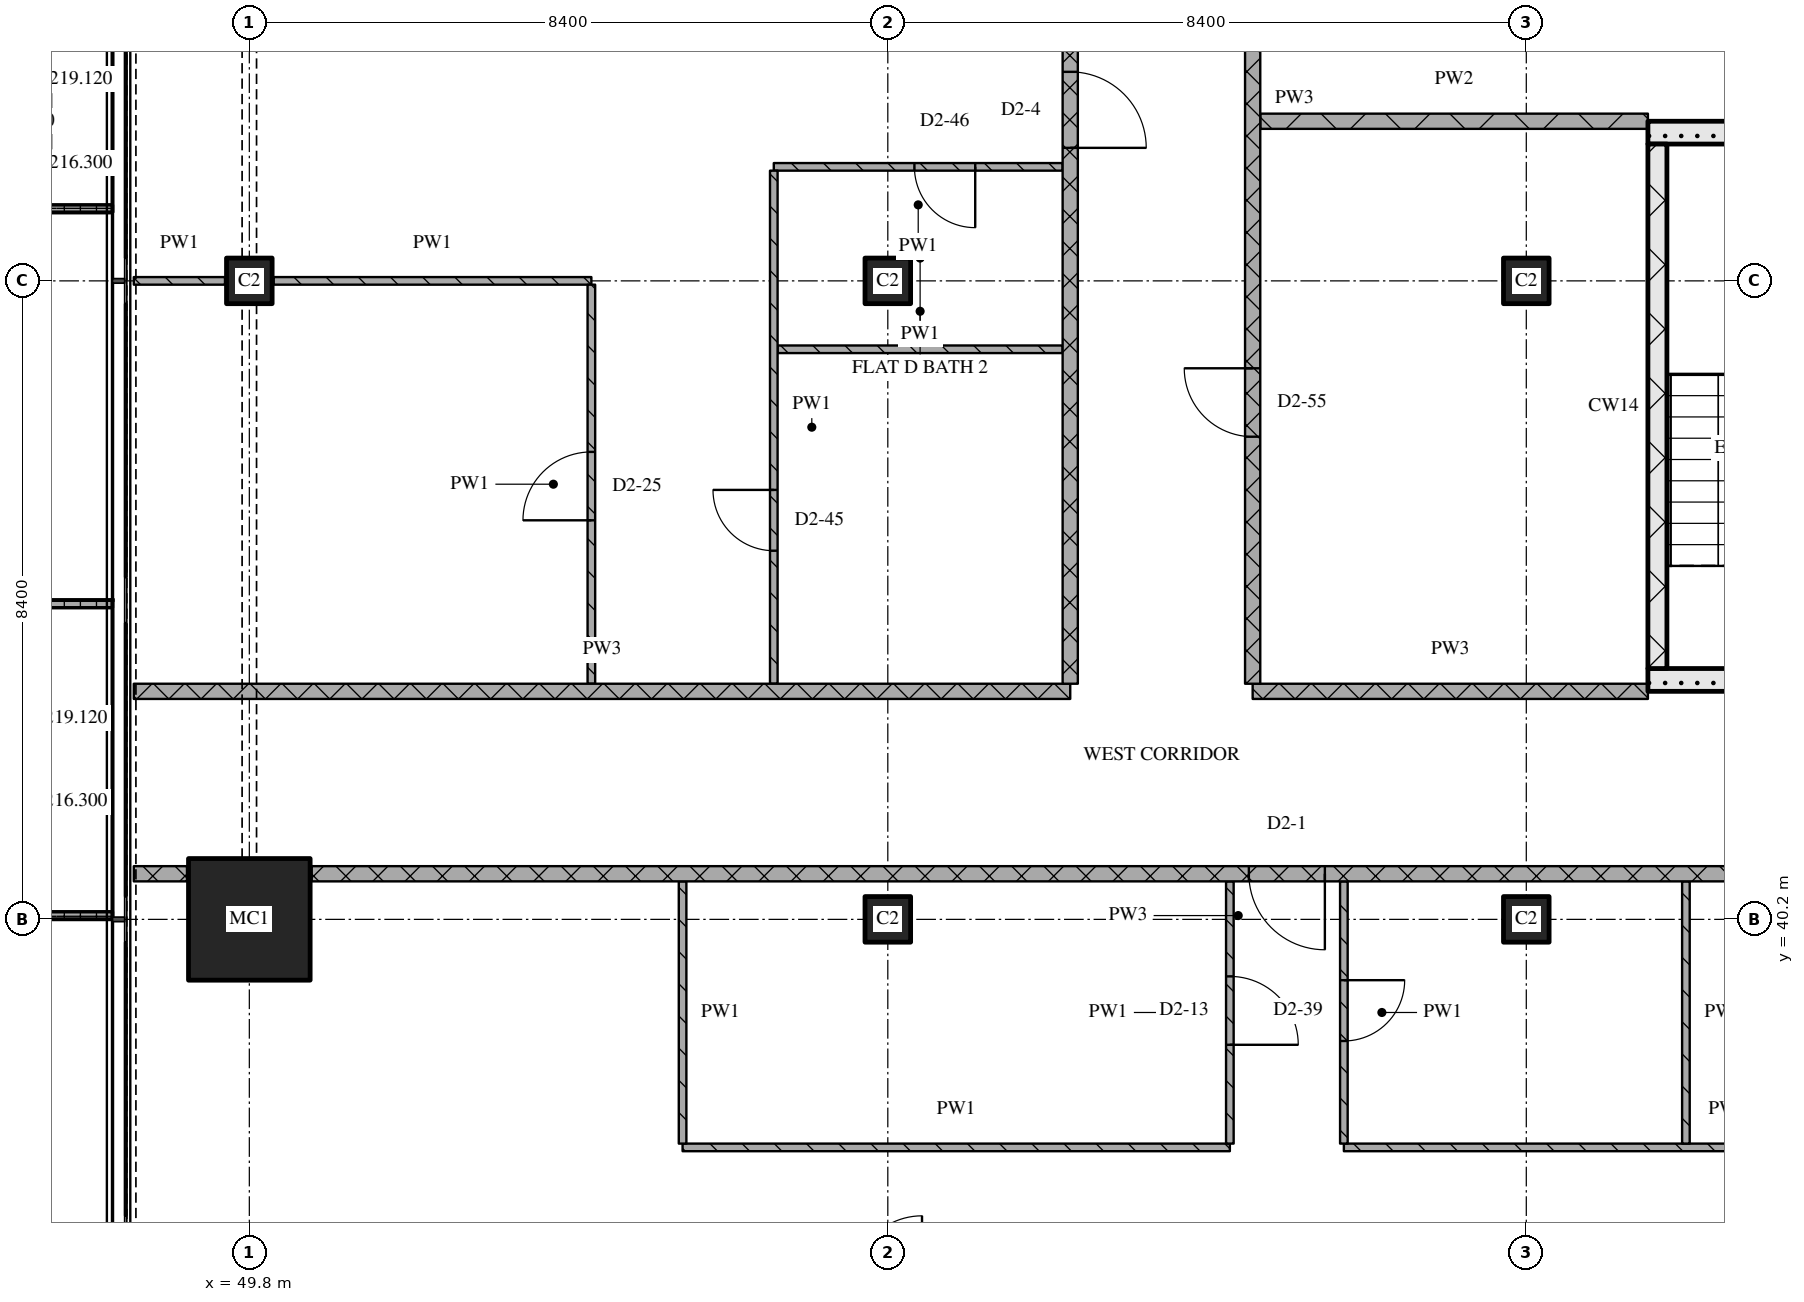
"""IFC4 building model, lengths in metres.
Left out: names, types, materials, properties, quantities, classifications, styles, units other than length and angle.
Written with IfcOpenShell. Run it as: python <this file> out.ifc"""

import sys

from ifc_helpers import new_model, si_unit, direction, frame, frame_2d, origin, origin_2d, place, context, subcontext, project, spatial, polyline, rectangle, outline, extrude, element, fill, save


model = new_model("IFC4")
c1 = context("Model", 3, precision=1e-05, world=origin(), true_north=direction((0.0, 1.0)))
c2 = subcontext(c1, "Body", "Model", "MODEL_VIEW")
j1 = project(units=[si_unit("LENGTHUNIT", "METRE"), si_unit("PLANEANGLEUNIT", "RADIAN")], contexts=[c1])
p1 = place(None, origin())
s1 = spatial("IfcSite", under=j1, at=p1, CompositionType="ELEMENT")
p2 = place(p1, origin())
s2 = spatial("IfcBuilding", under=s1, at=p2, CompositionType="ELEMENT")
p3 = place(p2, frame((0.0, 0.0, 216.3)))
s3 = spatial("IfcBuildingStorey", under=s2, at=p3, CompositionType="ELEMENT", Elevation=216.3)
p4 = place(p3, frame((49.8, 40.2, 0.0), z_axis=(0.0, 0.0, 1.0), x_axis=(1.0, 0.0, 0.0)))
e1 = element("IfcColumn", 1, at=p4, inside=s3, PredefinedType="COLUMN", context=c2, shape_type="SweptSolid", body=[
    extrude(rectangle(XDim=1.6, YDim=1.6, at=origin_2d()), origin(), (0.0, 0.0, 1.0), 3.6),
])
for number, where, z_axis, x_axis in (
    (2, (49.8, 48.6, 0.0), (0.0, 0.0, 1.0), (1.0, 0.0, 0.0)),
    (3, (58.2, 40.2, 0.0), (0.0, 0.0, 1.0), (1.0, 0.0, 0.0)),
    (4, (58.2, 48.6, 0.0), (0.0, 0.0, 1.0), (1.0, 0.0, 0.0)),
    (5, (66.6, 40.2, 0.0), (0.0, 0.0, 1.0), (1.0, 0.0, 0.0)),
    (6, (66.6, 48.6, 0.0), (0.0, 0.0, 1.0), (1.0, 0.0, 0.0)),
):
    element("IfcColumn", number, at=place(p3, frame(where, z_axis=z_axis, x_axis=x_axis)), inside=s3, PredefinedType="COLUMN", context=c2, shape_type="SweptSolid", body=[
        extrude(rectangle(XDim=0.6, YDim=0.6, at=origin_2d()), origin(), (0.0, 0.0, 1.0), 3.6),
    ])
p5 = place(p3, origin())
e7 = element("IfcWall", 7, at=p5, inside=s3, PredefinedType="SOLIDWALL", context=c2, shape_type="SweptSolid", body=[
    extrude(outline(polyline([(48.0, 51.9), (48.0, 51.8), (46.5, 51.8), (46.5, 49.6), (48.0, 49.6), (48.0, 49.5), (46.4, 49.5), (46.4, 51.9), (48.0, 51.9)])), origin(), (0.0, 0.0, 1.0), 1.0),
])
p6 = place(p3, origin())
e8 = element("IfcWall", 8, at=p6, inside=s3, PredefinedType="SOLIDWALL", context=c2, shape_type="SweptSolid", body=[
    extrude(outline(polyline([(48.0, 44.4), (48.0, 44.3), (46.367, 44.3), (46.367, 40.3), (48.0, 40.3), (48.0, 40.2), (46.267, 40.2), (46.267, 44.4), (48.0, 44.4)])), origin(), (0.0, 0.0, 1.0), 1.0),
])
p7 = place(p3, frame((68.2, 43.35, 0.0), z_axis=(0.0, 0.0, 1.0), x_axis=(1.0, 0.0, 0.0)))
e9 = element("IfcWall", 9, at=p7, inside=s3, PredefinedType="SOLIDWALL", context=c2, shape_type="SweptSolid", body=[
    extrude(rectangle(XDim=5.6, YDim=0.3, at=frame_2d((2.8, 0.0))), origin(), (0.0, 0.0, 1.0), 3.32),
])
p8 = place(p7, frame((3.875, 0.0, 0.0)))
e10 = element("IfcOpeningElement", 10, at=p8, cuts=e9, PredefinedType="OPENING", context=c2, shape_type="SweptSolid", body=[
    extrude(rectangle(XDim=1.0, YDim=2.1, at=frame_2d((0.5, 1.05))), frame((0.0, 0.16, 0.0), z_axis=(0.0, -1.0, 0.0), x_axis=(1.0, 0.0, 0.0)), (0.0, 0.0, 1.0), 0.32),
])
p9 = place(p3, frame((68.325, 43.5, 0.0), z_axis=(0.0, 0.0, 1.0), x_axis=(0.0, 1.0, 0.0)))
e11 = element("IfcWall", 11, at=p9, inside=s3, PredefinedType="SOLIDWALL", context=c2, shape_type="SweptSolid", body=[
    extrude(rectangle(XDim=6.9, YDim=0.25, at=frame_2d((3.45, 0.0))), origin(), (0.0, 0.0, 1.0), 3.32),
])
p10 = place(p3, frame((68.2, 50.55, 0.0), z_axis=(0.0, 0.0, 1.0), x_axis=(1.0, 0.0, 0.0)))
e12 = element("IfcWall", 12, at=p10, inside=s3, PredefinedType="SOLIDWALL", context=c2, shape_type="SweptSolid", body=[
    extrude(rectangle(XDim=5.6, YDim=0.3, at=frame_2d((2.8, 0.0))), origin(), (0.0, 0.0, 1.0), 3.32),
])
p11 = place(p3, frame((55.5, 37.2, 0.0), z_axis=(0.0, 0.0, 1.0), x_axis=(1.0, 0.0, 0.0)))
e13 = element("IfcWall", 13, at=p11, inside=s3, PredefinedType="PARTITIONING", context=c2, shape_type="SweptSolid", body=[
    extrude(rectangle(XDim=7.2, YDim=0.1, at=frame_2d((3.6, 0.0))), origin(), (0.0, 0.0, 1.0), 3.32),
])
p12 = place(p3, frame((64.2, 37.2, 0.0), z_axis=(0.0, 0.0, 1.0), x_axis=(1.0, 0.0, 0.0)))
e14 = element("IfcWall", 14, at=p12, inside=s3, PredefinedType="PARTITIONING", context=c2, shape_type="SweptSolid", body=[
    extrude(rectangle(XDim=10.7, YDim=0.1, at=frame_2d((5.35, 0.0))), origin(), (0.0, 0.0, 1.0), 3.32),
])
p13 = place(p12, frame((6.35, 0.0, 0.0)))
e15 = element("IfcOpeningElement", 15, at=p13, cuts=e14, PredefinedType="OPENING", context=c2, shape_type="SweptSolid", body=[
    extrude(rectangle(XDim=0.8, YDim=2.1, at=frame_2d((0.4, 1.05))), frame((0.0, 0.06, 0.0), z_axis=(0.0, -1.0, 0.0), x_axis=(1.0, 0.0, 0.0)), (0.0, 0.0, 1.0), 0.12),
])
p14 = place(p12, frame((9.45, 0.0, 0.0)))
e16 = element("IfcOpeningElement", 16, at=p14, cuts=e14, PredefinedType="OPENING", context=c2, shape_type="SweptSolid", body=[
    extrude(rectangle(XDim=0.9, YDim=2.1, at=frame_2d((0.45, 1.05))), frame((0.0, 0.06, 0.0), z_axis=(0.0, -1.0, 0.0), x_axis=(1.0, 0.0, 0.0)), (0.0, 0.0, 1.0), 0.12),
])
p15 = place(p3, frame((48.28, 40.8, 0.0), z_axis=(0.0, 0.0, 1.0), x_axis=(1.0, 0.0, 0.0)))
e17 = element("IfcWall", 17, at=p15, inside=s3, PredefinedType="PARTITIONING", context=c2, shape_type="SweptSolid", body=[
    extrude(rectangle(XDim=0.7, YDim=0.2, at=frame_2d((0.35, 0.0))), origin(), (0.0, 0.0, 1.0), 3.32),
])
p16 = place(p3, frame((75.0, 40.8, 0.0), z_axis=(0.0, 0.0, 1.0), x_axis=(-1.0, 0.0, 0.0)))
e18 = element("IfcWall", 18, at=p16, inside=s3, PredefinedType="PARTITIONING", context=c2, shape_type="SweptSolid", body=[
    extrude(rectangle(XDim=24.38, YDim=0.2, at=frame_2d((12.19, 0.0))), origin(), (0.0, 0.0, 1.0), 3.32),
])
p17 = place(p16, frame((11.05, 0.0, 0.0)))
e19 = element("IfcOpeningElement", 19, at=p17, cuts=e18, PredefinedType="OPENING", context=c2, shape_type="SweptSolid", body=[
    extrude(rectangle(XDim=1.0, YDim=2.1, at=frame_2d((0.5, 1.05))), frame((0.0, 0.11, 0.0), z_axis=(0.0, -1.0, 0.0), x_axis=(1.0, 0.0, 0.0)), (0.0, 0.0, 1.0), 0.22),
])
p18 = place(p3, frame((48.28, 43.2, 0.0), z_axis=(0.0, 0.0, 1.0), x_axis=(1.0, 0.0, 0.0)))
e20 = element("IfcWall", 20, at=p18, inside=s3, PredefinedType="PARTITIONING", context=c2, shape_type="SweptSolid", body=[
    extrude(rectangle(XDim=12.32, YDim=0.2, at=frame_2d((6.16, 0.0))), origin(), (0.0, 0.0, 1.0), 3.32),
])
p19 = place(p3, frame((63.0, 43.2, 0.0), z_axis=(0.0, 0.0, 1.0), x_axis=(1.0, 0.0, 0.0)))
e21 = element("IfcWall", 21, at=p19, inside=s3, PredefinedType="PARTITIONING", context=c2, shape_type="SweptSolid", body=[
    extrude(rectangle(XDim=5.2, YDim=0.2, at=frame_2d((2.6, 0.0))), origin(), (0.0, 0.0, 1.0), 3.32),
])
p20 = place(p3, frame((56.75, 47.7, 0.0), z_axis=(0.0, 0.0, 1.0), x_axis=(1.0, 0.0, 0.0)))
e22 = element("IfcWall", 22, at=p20, inside=s3, PredefinedType="PARTITIONING", context=c2, shape_type="SweptSolid", body=[
    extrude(rectangle(XDim=3.75, YDim=0.1, at=frame_2d((1.875, 0.0))), origin(), (0.0, 0.0, 1.0), 3.32),
])
p21 = place(p3, frame((48.28, 48.6, 0.0), z_axis=(0.0, 0.0, 1.0), x_axis=(1.0, 0.0, 0.0)))
e23 = element("IfcWall", 23, at=p21, inside=s3, PredefinedType="PARTITIONING", context=c2, shape_type="SweptSolid", body=[
    extrude(rectangle(XDim=1.2, YDim=0.1, at=frame_2d((0.6, 0.0))), origin(), (0.0, 0.0, 1.0), 3.32),
])
p22 = place(p3, frame((50.12, 48.6, 0.0), z_axis=(0.0, 0.0, 1.0), x_axis=(1.0, 0.0, 0.0)))
e24 = element("IfcWall", 24, at=p22, inside=s3, PredefinedType="PARTITIONING", context=c2, shape_type="SweptSolid", body=[
    extrude(rectangle(XDim=4.18, YDim=0.1, at=frame_2d((2.09, 0.0))), origin(), (0.0, 0.0, 1.0), 3.32),
])
p23 = place(p3, frame((60.5, 50.1, 0.0), z_axis=(0.0, 0.0, 1.0), x_axis=(-1.0, 0.0, 0.0)))
e25 = element("IfcWall", 25, at=p23, inside=s3, PredefinedType="PARTITIONING", context=c2, shape_type="SweptSolid", body=[
    extrude(rectangle(XDim=3.8, YDim=0.1, at=frame_2d((1.9, 0.0))), origin(), (0.0, 0.0, 1.0), 3.32),
])
p24 = place(p23, frame((1.15, 0.0, 0.0)))
e26 = element("IfcOpeningElement", 26, at=p24, cuts=e25, PredefinedType="OPENING", context=c2, shape_type="SweptSolid", body=[
    extrude(rectangle(XDim=0.8, YDim=2.1, at=frame_2d((0.4, 1.05))), frame((0.0, 0.06, 0.0), z_axis=(0.0, -1.0, 0.0), x_axis=(1.0, 0.0, 0.0)), (0.0, 0.0, 1.0), 0.12),
])
p25 = place(p3, frame((63.1, 50.7, 0.0), z_axis=(0.0, 0.0, 1.0), x_axis=(1.0, 0.0, 0.0)))
e27 = element("IfcWall", 27, at=p25, inside=s3, PredefinedType="PARTITIONING", context=c2, shape_type="SweptSolid", body=[
    extrude(rectangle(XDim=5.1, YDim=0.2, at=frame_2d((2.55, 0.0))), origin(), (0.0, 0.0, 1.0), 3.32),
])
p26 = place(p3, frame((54.3, 43.3, 0.0), z_axis=(0.0, 0.0, 1.0), x_axis=(0.0, 1.0, 0.0)))
e28 = element("IfcWall", 28, at=p26, inside=s3, PredefinedType="PARTITIONING", context=c2, shape_type="SweptSolid", body=[
    extrude(rectangle(XDim=5.25, YDim=0.1, at=frame_2d((2.625, 0.0))), origin(), (0.0, 0.0, 1.0), 3.32),
])
p27 = place(p26, frame((2.15, 0.0, 0.0)))
e29 = element("IfcOpeningElement", 29, at=p27, cuts=e28, PredefinedType="OPENING", context=c2, shape_type="SweptSolid", body=[
    extrude(rectangle(XDim=0.9, YDim=2.1, at=frame_2d((0.45, 1.05))), frame((0.0, 0.06, 0.0), z_axis=(0.0, -1.0, 0.0), x_axis=(1.0, 0.0, 0.0)), (0.0, 0.0, 1.0), 0.12),
])
p28 = place(p3, frame((55.5, 40.7, 0.0), z_axis=(0.0, 0.0, 1.0), x_axis=(0.0, -1.0, 0.0)))
e30 = element("IfcWall", 30, at=p28, inside=s3, PredefinedType="PARTITIONING", context=c2, shape_type="SweptSolid", body=[
    extrude(rectangle(XDim=3.45, YDim=0.1, at=frame_2d((1.725, 0.0))), origin(), (0.0, 0.0, 1.0), 3.32),
])
p29 = place(p3, frame((56.7, 50.05, 0.0), z_axis=(0.0, 0.0, 1.0), x_axis=(0.0, -1.0, 0.0)))
e31 = element("IfcWall", 31, at=p29, inside=s3, PredefinedType="PARTITIONING", context=c2, shape_type="SweptSolid", body=[
    extrude(rectangle(XDim=6.75, YDim=0.1, at=frame_2d((3.375, 0.0))), origin(), (0.0, 0.0, 1.0), 3.32),
])
p30 = place(p29, frame((4.2, 0.0, 0.0)))
e32 = element("IfcOpeningElement", 32, at=p30, cuts=e31, PredefinedType="OPENING", context=c2, shape_type="SweptSolid", body=[
    extrude(rectangle(XDim=0.8, YDim=2.1, at=frame_2d((0.4, 1.05))), frame((0.0, 0.06, 0.0), z_axis=(0.0, -1.0, 0.0), x_axis=(1.0, 0.0, 0.0)), (0.0, 0.0, 1.0), 0.12),
])
p31 = place(p3, frame((60.6, 43.3, 0.0), z_axis=(0.0, 0.0, 1.0), x_axis=(0.0, 1.0, 0.0)))
e33 = element("IfcWall", 33, at=p31, inside=s3, PredefinedType="PARTITIONING", context=c2, shape_type="SweptSolid", body=[
    extrude(rectangle(XDim=17.8, YDim=0.2, at=frame_2d((8.9, 0.0))), origin(), (0.0, 0.0, 1.0), 3.32),
])
p32 = place(p31, frame((7.05, 0.0, 0.0)))
e34 = element("IfcOpeningElement", 34, at=p32, cuts=e33, PredefinedType="OPENING", context=c2, shape_type="SweptSolid", body=[
    extrude(rectangle(XDim=1.0, YDim=2.1, at=frame_2d((0.5, 1.05))), frame((0.0, 0.11, 0.0), z_axis=(0.0, -1.0, 0.0), x_axis=(1.0, 0.0, 0.0)), (0.0, 0.0, 1.0), 0.22),
])
p33 = place(p3, frame((62.7, 37.25, 0.0), z_axis=(0.0, 0.0, 1.0), x_axis=(0.0, 1.0, 0.0)))
e35 = element("IfcWall", 35, at=p33, inside=s3, PredefinedType="PARTITIONING", context=c2, shape_type="SweptSolid", body=[
    extrude(rectangle(XDim=3.45, YDim=0.1, at=frame_2d((1.725, 0.0))), origin(), (0.0, 0.0, 1.0), 3.32),
])
p34 = place(p33, frame((1.3, 0.0, 0.0)))
e36 = element("IfcOpeningElement", 36, at=p34, cuts=e35, PredefinedType="OPENING", context=c2, shape_type="SweptSolid", body=[
    extrude(rectangle(XDim=0.9, YDim=2.1, at=frame_2d((0.45, 1.05))), frame((0.0, 0.06, 0.0), z_axis=(0.0, -1.0, 0.0), x_axis=(1.0, 0.0, 0.0)), (0.0, 0.0, 1.0), 0.12),
])
p35 = place(p3, frame((63.0, 58.7, 0.0), z_axis=(0.0, 0.0, 1.0), x_axis=(0.0, -1.0, 0.0)))
e37 = element("IfcWall", 37, at=p35, inside=s3, PredefinedType="PARTITIONING", context=c2, shape_type="SweptSolid", body=[
    extrude(rectangle(XDim=15.4, YDim=0.2, at=frame_2d((7.7, 0.0))), origin(), (0.0, 0.0, 1.0), 3.32),
])
p36 = place(p35, frame((3.45, 0.0, 0.0)))
e38 = element("IfcOpeningElement", 38, at=p36, cuts=e37, PredefinedType="OPENING", context=c2, shape_type="SweptSolid", body=[
    extrude(rectangle(XDim=1.0, YDim=2.1, at=frame_2d((0.5, 1.05))), frame((0.0, 0.11, 0.0), z_axis=(0.0, -1.0, 0.0), x_axis=(1.0, 0.0, 0.0)), (0.0, 0.0, 1.0), 0.22),
])
p37 = place(p35, frame((11.25, 0.0, 0.0)))
e39 = element("IfcOpeningElement", 39, at=p37, cuts=e37, PredefinedType="OPENING", context=c2, shape_type="SweptSolid", body=[
    extrude(rectangle(XDim=0.9, YDim=2.1, at=frame_2d((0.45, 1.05))), frame((0.0, 0.11, 0.0), z_axis=(0.0, -1.0, 0.0), x_axis=(1.0, 0.0, 0.0)), (0.0, 0.0, 1.0), 0.22),
])
p38 = place(p3, frame((64.2, 40.7, 0.0), z_axis=(0.0, 0.0, 1.0), x_axis=(0.0, -1.0, 0.0)))
e40 = element("IfcWall", 40, at=p38, inside=s3, PredefinedType="PARTITIONING", context=c2, shape_type="SweptSolid", body=[
    extrude(rectangle(XDim=3.45, YDim=0.1, at=frame_2d((1.725, 0.0))), origin(), (0.0, 0.0, 1.0), 3.32),
])
p39 = place(p38, frame((1.3, 0.0, 0.0)))
e41 = element("IfcOpeningElement", 41, at=p39, cuts=e40, PredefinedType="OPENING", context=c2, shape_type="SweptSolid", body=[
    extrude(rectangle(XDim=0.8, YDim=2.1, at=frame_2d((0.4, 1.05))), frame((0.0, 0.06, 0.0), z_axis=(0.0, -1.0, 0.0), x_axis=(1.0, 0.0, 0.0)), (0.0, 0.0, 1.0), 0.12),
])
p40 = place(p3, frame((68.7, 40.7, 0.0), z_axis=(0.0, 0.0, 1.0), x_axis=(0.0, -1.0, 0.0)))
e42 = element("IfcWall", 42, at=p40, inside=s3, PredefinedType="PARTITIONING", context=c2, shape_type="SweptSolid", body=[
    extrude(rectangle(XDim=3.45, YDim=0.1, at=frame_2d((1.725, 0.0))), origin(), (0.0, 0.0, 1.0), 3.32),
])
p41 = place(p17, origin())
e43 = element("IfcDoor", 43, at=p41, inside=s3, OperationType="SINGLE_SWING_LEFT", PredefinedType="DOOR", context=c2, shape_type="SweptSolid", body=[
    extrude(rectangle(XDim=1.0, YDim=2.1, at=frame_2d((0.5, 1.05))), frame((0.0, 0.025, 0.0), z_axis=(0.0, -1.0, 0.0), x_axis=(1.0, 0.0, 0.0)), (0.0, 0.0, 1.0), 0.05),
])
fill(e19, e43)
p42 = place(p24, origin())
e44 = element("IfcDoor", 44, at=p42, inside=s3, OperationType="SINGLE_SWING_LEFT", PredefinedType="DOOR", context=c2, shape_type="SweptSolid", body=[
    extrude(rectangle(XDim=0.8, YDim=2.1, at=frame_2d((0.4, 1.05))), frame((0.0, 0.025, 0.0), z_axis=(0.0, -1.0, 0.0), x_axis=(1.0, 0.0, 0.0)), (0.0, 0.0, 1.0), 0.05),
])
fill(e26, e44)
p43 = place(p27, origin())
e45 = element("IfcDoor", 45, at=p43, inside=s3, OperationType="SINGLE_SWING_LEFT", PredefinedType="DOOR", context=c2, shape_type="SweptSolid", body=[
    extrude(rectangle(XDim=0.9, YDim=2.1, at=frame_2d((0.45, 1.05))), frame((0.0, 0.025, 0.0), z_axis=(0.0, -1.0, 0.0), x_axis=(1.0, 0.0, 0.0)), (0.0, 0.0, 1.0), 0.05),
])
fill(e29, e45)
p44 = place(p30, origin())
e46 = element("IfcDoor", 46, at=p44, inside=s3, OperationType="SINGLE_SWING_RIGHT", PredefinedType="DOOR", context=c2, shape_type="SweptSolid", body=[
    extrude(rectangle(XDim=0.8, YDim=2.1, at=frame_2d((0.4, 1.05))), frame((0.0, 0.025, 0.0), z_axis=(0.0, -1.0, 0.0), x_axis=(1.0, 0.0, 0.0)), (0.0, 0.0, 1.0), 0.05),
])
fill(e32, e46)
p45 = place(p32, origin())
e47 = element("IfcDoor", 47, at=p45, inside=s3, OperationType="SINGLE_SWING_RIGHT", PredefinedType="DOOR", context=c2, shape_type="SweptSolid", body=[
    extrude(rectangle(XDim=1.0, YDim=2.1, at=frame_2d((0.5, 1.05))), frame((0.0, 0.025, 0.0), z_axis=(0.0, -1.0, 0.0), x_axis=(1.0, 0.0, 0.0)), (0.0, 0.0, 1.0), 0.05),
])
fill(e34, e47)
p46 = place(p34, origin())
e48 = element("IfcDoor", 48, at=p46, inside=s3, OperationType="SINGLE_SWING_RIGHT", PredefinedType="DOOR", context=c2, shape_type="SweptSolid", body=[
    extrude(rectangle(XDim=0.9, YDim=2.1, at=frame_2d((0.45, 1.05))), frame((0.0, 0.025, 0.0), z_axis=(0.0, -1.0, 0.0), x_axis=(1.0, 0.0, 0.0)), (0.0, 0.0, 1.0), 0.05),
])
fill(e36, e48)
p47 = place(p37, origin())
e49 = element("IfcDoor", 49, at=p47, inside=s3, OperationType="SINGLE_SWING_RIGHT", PredefinedType="DOOR", context=c2, shape_type="SweptSolid", body=[
    extrude(rectangle(XDim=0.9, YDim=2.1, at=frame_2d((0.45, 1.05))), frame((0.0, 0.025, 0.0), z_axis=(0.0, -1.0, 0.0), x_axis=(1.0, 0.0, 0.0)), (0.0, 0.0, 1.0), 0.05),
])
fill(e39, e49)
p48 = place(p39, origin())
e50 = element("IfcDoor", 50, at=p48, inside=s3, OperationType="SINGLE_SWING_LEFT", PredefinedType="DOOR", context=c2, shape_type="SweptSolid", body=[
    extrude(rectangle(XDim=0.8, YDim=2.1, at=frame_2d((0.4, 1.05))), frame((0.0, 0.025, 0.0), z_axis=(0.0, -1.0, 0.0), x_axis=(1.0, 0.0, 0.0)), (0.0, 0.0, 1.0), 0.05),
])
fill(e41, e50)
save(model, sys.argv[1])
